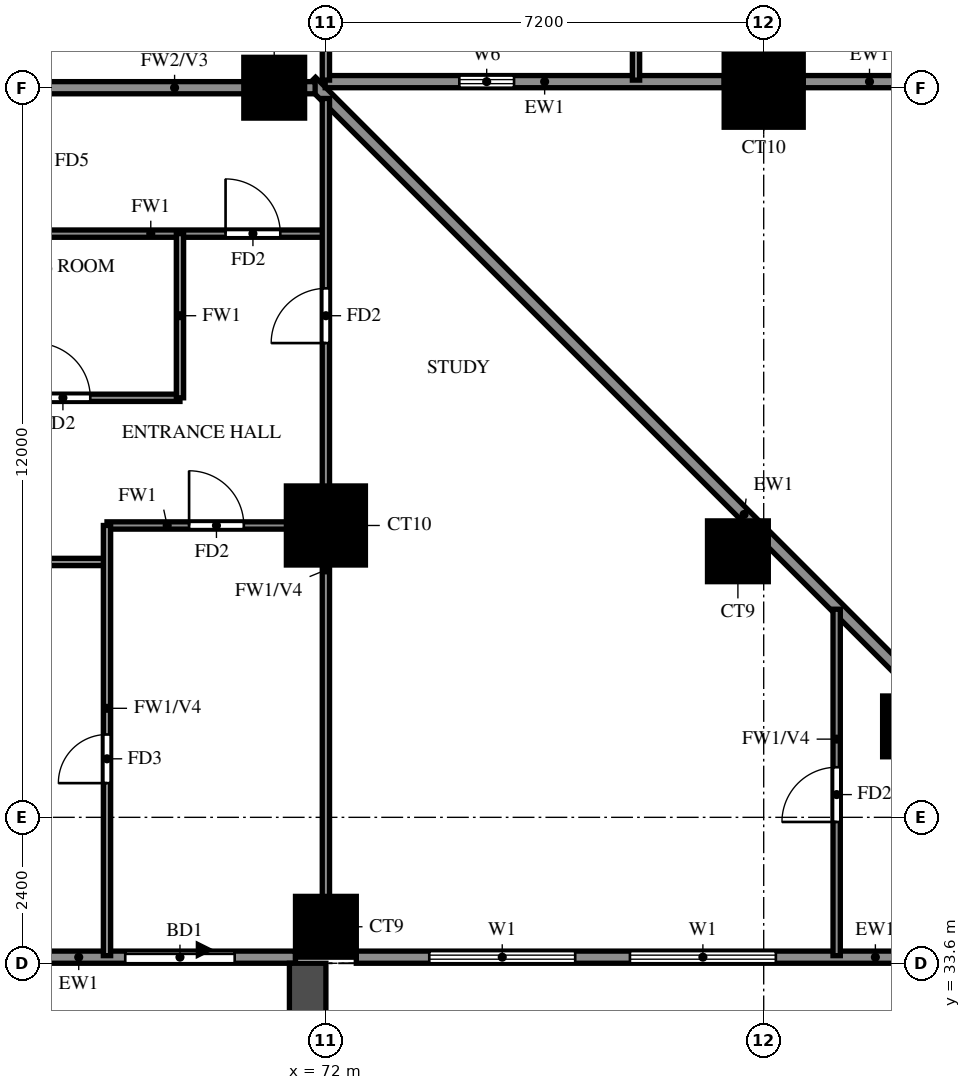
"""IFC4 building model, lengths in metres.
Left out: names, types, materials, properties, quantities, classifications, styles, units other than length and angle.
Written with IfcOpenShell. Run it as: python <this file> out.ifc"""

import sys

from ifc_helpers import new_model, si_unit, direction, frame, frame_2d, origin, origin_2d, place, context, subcontext, project, spatial, rectangle, extrude, source, transform, mapped, element, fill, save


model = new_model("IFC4")
c1 = context("Model", 3, precision=1e-05, world=origin(), true_north=direction((0.0, 1.0)))
c2 = subcontext(c1, "Body", "Model", "MODEL_VIEW")
j1 = project(units=[si_unit("LENGTHUNIT", "METRE"), si_unit("PLANEANGLEUNIT", "RADIAN")], contexts=[c1])
p1 = place(None, origin())
s1 = spatial("IfcSite", under=j1, at=p1, CompositionType="ELEMENT")
p2 = place(p1, origin())
s2 = spatial("IfcBuilding", under=s1, at=p2, CompositionType="ELEMENT")
p3 = place(p2, frame((0.0, 0.0, 72.5)))
s3 = spatial("IfcBuildingStorey", under=s2, at=p3, CompositionType="ELEMENT", Elevation=72.5)
m1 = source(origin(), c2, "Body", "SweptSolid", [
    extrude(rectangle(XDim=1.0, YDim=1.0, at=origin_2d()), origin(), (0.0, 0.0, 1.0), 3.18),
])
for number, where, z_axis, x_axis in (
    (1, (72.0, 34.2, 0.0), (0.0, 0.0, 1.0), (1.0, 0.0, 0.0)),
    (2, (81.656, 37.496, 0.0), (0.0, 0.0, 1.0), (1.0, 0.0, 0.0)),
    (3, (78.776, 40.376, 0.0), (0.0, 0.0, 1.0), (1.0, 0.0, 0.0)),
):
    element("IfcColumn", number, at=place(p3, frame(where, z_axis=z_axis, x_axis=x_axis)), inside=s3, PredefinedType="COLUMN", context=c2, shape_type="MappedRepresentation", body=[
        mapped(m1, transform((0.0, 0.0, 0.0))),
    ])
m2 = source(origin(), c2, "Body", "SweptSolid", [
    extrude(rectangle(XDim=1.3, YDim=1.3, at=origin_2d()), origin(), (0.0, 0.0, 1.0), 3.18),
])
p4 = place(p3, frame((72.0, 40.8, 0.0), z_axis=(0.0, 0.0, 1.0), x_axis=(1.0, 0.0, 0.0)))
e4 = element("IfcColumn", 4, at=p4, inside=s3, PredefinedType="COLUMN", context=c2, shape_type="MappedRepresentation", body=[
    mapped(m2, transform((0.0, 0.0, 0.0))),
])
p5 = place(p3, frame((71.15, 48.0, 0.0), z_axis=(0.0, 0.0, 1.0), x_axis=(1.0, 0.0, 0.0)))
e5 = element("IfcColumn", 5, at=p5, inside=s3, PredefinedType="COLUMN", context=c2, shape_type="MappedRepresentation", body=[
    mapped(m1, transform((0.0, 0.0, 0.0))),
])
p6 = place(p3, frame((79.2, 48.0, 0.0), z_axis=(0.0, 0.0, 1.0), x_axis=(1.0, 0.0, 0.0)))
e6 = element("IfcColumn", 6, at=p6, inside=s3, PredefinedType="COLUMN", context=c2, shape_type="MappedRepresentation", body=[
    mapped(m2, transform((0.0, 0.0, 0.0))),
])
p7 = place(p3, frame((85.996, 33.863, 0.0), z_axis=(0.0, 0.0, 1.0), x_axis=(-0.707100718496, 0.707112843825, 0.0)))
e7 = element("IfcWall", 7, at=p7, inside=s3, PredefinedType="SOLIDWALL", context=c2, shape_type="SweptSolid", body=[
    extrude(rectangle(XDim=20.135, YDim=0.2, at=frame_2d((10.067, 0.0))), origin(), (0.0, 0.0, 1.0), 3.18),
])
p8 = place(p3, frame((71.989, 48.1, 0.0), z_axis=(0.0, 0.0, 1.0), x_axis=(1.0, 0.0, 0.0)))
e8 = element("IfcWall", 8, at=p8, inside=s3, PredefinedType="SOLIDWALL", context=c2, shape_type="SweptSolid", body=[
    extrude(rectangle(XDim=6.562, YDim=0.2, at=frame_2d((3.281, 0.0))), origin(), (0.0, 0.0, 1.0), 3.18),
])
p9 = place(p8, frame((2.206, 0.0, 1.5)))
e9 = element("IfcOpeningElement", 9, at=p9, cuts=e8, PredefinedType="OPENING", context=c2, shape_type="SweptSolid", body=[
    extrude(rectangle(XDim=0.9, YDim=0.9, at=frame_2d((0.45, 0.45))), frame((0.0, 0.11, 0.0), z_axis=(0.0, -1.0, 0.0), x_axis=(1.0, 0.0, 0.0)), (0.0, 0.0, 1.0), 0.22),
])
p10 = place(p3, frame((79.85, 48.1, 0.0), z_axis=(0.0, 0.0, 1.0), x_axis=(1.0, 0.0, 0.0)))
e10 = element("IfcWall", 10, at=p10, inside=s3, PredefinedType="SOLIDWALL", context=c2, shape_type="SweptSolid", body=[
    extrude(rectangle(XDim=5.45, YDim=0.2, at=frame_2d((2.725, 0.0))), origin(), (0.0, 0.0, 1.0), 3.18),
])
p11 = place(p10, frame((1.525, 0.0, 0.6)))
e11 = element("IfcOpeningElement", 11, at=p11, cuts=e10, PredefinedType="OPENING", context=c2, shape_type="SweptSolid", body=[
    extrude(rectangle(XDim=2.4, YDim=2.4, at=frame_2d((1.2, 1.2))), frame((0.0, 0.11, 0.0), z_axis=(0.0, -1.0, 0.0), x_axis=(1.0, 0.0, 0.0)), (0.0, 0.0, 1.0), 0.22),
])
p12 = place(p3, frame((65.3, 33.7, 0.0), z_axis=(0.0, 0.0, 1.0), x_axis=(1.0, 0.0, 0.0)))
e12 = element("IfcWall", 12, at=p12, inside=s3, PredefinedType="SOLIDWALL", context=c2, shape_type="SweptSolid", body=[
    extrude(rectangle(XDim=6.2, YDim=0.2, at=frame_2d((3.1, 0.0))), origin(), (0.0, 0.0, 1.0), 3.18),
])
p13 = place(p12, frame((3.4, 0.0, 0.0)))
e13 = element("IfcOpeningElement", 13, at=p13, cuts=e12, PredefinedType="OPENING", context=c2, shape_type="SweptSolid", body=[
    extrude(rectangle(XDim=1.8, YDim=2.4, at=frame_2d((0.9, 1.2))), frame((0.0, 0.11, 0.0), z_axis=(0.0, -1.0, 0.0), x_axis=(1.0, 0.0, 0.0)), (0.0, 0.0, 1.0), 0.22),
])
p14 = place(p12, frame((1.2, 0.0, 1.5)))
e14 = element("IfcOpeningElement", 14, at=p14, cuts=e12, PredefinedType="OPENING", context=c2, shape_type="SweptSolid", body=[
    extrude(rectangle(XDim=0.9, YDim=0.9, at=frame_2d((0.45, 0.45))), frame((0.0, 0.11, 0.0), z_axis=(0.0, -1.0, 0.0), x_axis=(1.0, 0.0, 0.0)), (0.0, 0.0, 1.0), 0.22),
])
p15 = place(p3, frame((72.5, 33.7, 0.0), z_axis=(0.0, 0.0, 1.0), x_axis=(1.0, 0.0, 0.0)))
e15 = element("IfcWall", 15, at=p15, inside=s3, PredefinedType="SOLIDWALL", context=c2, shape_type="SweptSolid", body=[
    extrude(rectangle(XDim=13.659, YDim=0.2, at=frame_2d((6.829, 0.0))), origin(), (0.0, 0.0, 1.0), 3.18),
])
p16 = place(p15, frame((1.2, 0.0, 0.6)))
e16 = element("IfcOpeningElement", 16, at=p16, cuts=e15, PredefinedType="OPENING", context=c2, shape_type="SweptSolid", body=[
    extrude(rectangle(XDim=2.4, YDim=2.4, at=frame_2d((1.2, 1.2))), frame((0.0, 0.11, 0.0), z_axis=(0.0, -1.0, 0.0), x_axis=(1.0, 0.0, 0.0)), (0.0, 0.0, 1.0), 0.22),
])
p17 = place(p15, frame((4.5, 0.0, 0.6)))
e17 = element("IfcOpeningElement", 17, at=p17, cuts=e15, PredefinedType="OPENING", context=c2, shape_type="SweptSolid", body=[
    extrude(rectangle(XDim=2.4, YDim=2.4, at=frame_2d((1.2, 1.2))), frame((0.0, 0.11, 0.0), z_axis=(0.0, -1.0, 0.0), x_axis=(1.0, 0.0, 0.0)), (0.0, 0.0, 1.0), 0.22),
])
p18 = place(p15, frame((9.479, 0.0, 0.6)))
e18 = element("IfcOpeningElement", 18, at=p18, cuts=e15, PredefinedType="OPENING", context=c2, shape_type="SweptSolid", body=[
    extrude(rectangle(XDim=2.4, YDim=2.4, at=frame_2d((1.2, 1.2))), frame((0.0, 0.11, 0.0), z_axis=(0.0, -1.0, 0.0), x_axis=(1.0, 0.0, 0.0)), (0.0, 0.0, 1.0), 0.22),
])
p19 = place(p3, frame((71.7, 33.6, 0.0), z_axis=(0.0, 0.0, 1.0), x_axis=(0.0, -1.0, 0.0)))
e19 = element("IfcWall", 19, at=p19, inside=s3, PredefinedType="SOLIDWALL", context=c2, shape_type="SweptSolid", body=[
    extrude(rectangle(XDim=2.7, YDim=0.6, at=frame_2d((1.35, 0.0))), origin(), (0.0, 0.0, 1.0), 2.85),
])
p20 = place(p3, frame((67.2, 48.0, 0.0), z_axis=(0.0, 0.0, 1.0), x_axis=(1.0, 0.0, 0.0)))
e20 = element("IfcWall", 20, at=p20, inside=s3, PredefinedType="SOLIDWALL", context=c2, shape_type="SweptSolid", body=[
    extrude(rectangle(XDim=4.623, YDim=0.2, at=frame_2d((2.312, 0.0))), origin(), (0.0, 0.0, 1.0), 3.18),
])
p21 = place(p3, frame((64.8, 40.2, 0.0), z_axis=(0.0, 0.0, 1.0), x_axis=(1.0, 0.0, 0.0)))
e21 = element("IfcWall", 21, at=p21, inside=s3, PredefinedType="PARTITIONING", context=c2, shape_type="SweptSolid", body=[
    extrude(rectangle(XDim=3.6, YDim=0.12, at=frame_2d((1.8, 0.0))), origin(), (0.0, 0.0, 1.0), 3.18),
])
p22 = place(p3, frame((68.4, 40.8, 0.0), z_axis=(0.0, 0.0, 1.0), x_axis=(1.0, 0.0, 0.0)))
e22 = element("IfcWall", 22, at=p22, inside=s3, PredefinedType="PARTITIONING", context=c2, shape_type="SweptSolid", body=[
    extrude(rectangle(XDim=3.6, YDim=0.12, at=frame_2d((1.8, 0.0))), origin(), (0.0, 0.0, 1.0), 3.18),
])
p23 = place(p22, frame((1.35, 0.0, 0.0)))
e23 = element("IfcOpeningElement", 23, at=p23, cuts=e22, PredefinedType="OPENING", context=c2, shape_type="SweptSolid", body=[
    extrude(rectangle(XDim=0.9, YDim=2.1, at=frame_2d((0.45, 1.05))), frame((0.0, 0.07, 0.0), z_axis=(0.0, -1.0, 0.0), x_axis=(1.0, 0.0, 0.0)), (0.0, 0.0, 1.0), 0.14),
])
p24 = place(p3, frame((60.0, 42.9, 0.0), z_axis=(0.0, 0.0, 1.0), x_axis=(1.0, 0.0, 0.0)))
e24 = element("IfcWall", 24, at=p24, inside=s3, PredefinedType="PARTITIONING", context=c2, shape_type="SweptSolid", body=[
    extrude(rectangle(XDim=9.6, YDim=0.12, at=frame_2d((4.8, 0.0))), origin(), (0.0, 0.0, 1.0), 3.18),
])
p25 = place(p24, frame((7.225, 0.0, 0.0)))
e25 = element("IfcOpeningElement", 25, at=p25, cuts=e24, PredefinedType="OPENING", context=c2, shape_type="SweptSolid", body=[
    extrude(rectangle(XDim=0.9, YDim=2.1, at=frame_2d((0.45, 1.05))), frame((0.0, 0.07, 0.0), z_axis=(0.0, -1.0, 0.0), x_axis=(1.0, 0.0, 0.0)), (0.0, 0.0, 1.0), 0.14),
])
p26 = place(p24, frame((2.425, 0.0, 0.0)))
e26 = element("IfcOpeningElement", 26, at=p26, cuts=e24, PredefinedType="OPENING", context=c2, shape_type="SweptSolid", body=[
    extrude(rectangle(XDim=0.9, YDim=2.1, at=frame_2d((0.45, 1.05))), frame((0.0, 0.07, 0.0), z_axis=(0.0, -1.0, 0.0), x_axis=(1.0, 0.0, 0.0)), (0.0, 0.0, 1.0), 0.14),
])
p27 = place(p3, frame((67.2, 45.6, 0.0), z_axis=(0.0, 0.0, 1.0), x_axis=(1.0, 0.0, 0.0)))
e27 = element("IfcWall", 27, at=p27, inside=s3, PredefinedType="PARTITIONING", context=c2, shape_type="SweptSolid", body=[
    extrude(rectangle(XDim=4.8, YDim=0.12, at=frame_2d((2.4, 0.0))), origin(), (0.0, 0.0, 1.0), 3.18),
])
p28 = place(p27, frame((3.15, 0.0, 0.0)))
e28 = element("IfcOpeningElement", 28, at=p28, cuts=e27, PredefinedType="OPENING", context=c2, shape_type="SweptSolid", body=[
    extrude(rectangle(XDim=0.9, YDim=2.1, at=frame_2d((0.45, 1.05))), frame((0.0, 0.07, 0.0), z_axis=(0.0, -1.0, 0.0), x_axis=(1.0, 0.0, 0.0)), (0.0, 0.0, 1.0), 0.14),
])
p29 = place(p3, frame((68.4, 33.725, 0.0), z_axis=(0.0, 0.0, 1.0), x_axis=(0.0, 1.0, 0.0)))
e29 = element("IfcWall", 29, at=p29, inside=s3, PredefinedType="PARTITIONING", context=c2, shape_type="SweptSolid", body=[
    extrude(rectangle(XDim=7.075, YDim=0.12, at=frame_2d((3.538, 0.0))), origin(), (0.0, 0.0, 1.0), 2.28),
])
p30 = place(p29, frame((2.837, 0.0, 0.0)))
e30 = element("IfcOpeningElement", 30, at=p30, cuts=e29, PredefinedType="OPENING", context=c2, shape_type="SweptSolid", body=[
    extrude(rectangle(XDim=0.8, YDim=2.1, at=frame_2d((0.4, 1.05))), frame((0.0, 0.07, 0.0), z_axis=(0.0, -1.0, 0.0), x_axis=(1.0, 0.0, 0.0)), (0.0, 0.0, 1.0), 0.14),
])
p31 = place(p3, frame((69.6, 42.9, 0.0), z_axis=(0.0, 0.0, 1.0), x_axis=(0.0, 1.0, 0.0)))
e31 = element("IfcWall", 31, at=p31, inside=s3, PredefinedType="PARTITIONING", context=c2, shape_type="SweptSolid", body=[
    extrude(rectangle(XDim=2.7, YDim=0.12, at=frame_2d((1.35, 0.0))), origin(), (0.0, 0.0, 1.0), 3.18),
])
p32 = place(p3, frame((72.0, 33.725, 0.0), z_axis=(0.0, 0.0, 1.0), x_axis=(0.0, 1.0, 0.0)))
e32 = element("IfcWall", 32, at=p32, inside=s3, PredefinedType="PARTITIONING", context=c2, shape_type="SweptSolid", body=[
    extrude(rectangle(XDim=14.098, YDim=0.12, at=frame_2d((7.049, 0.0))), origin(), (0.0, 0.0, 1.0), 2.28),
])
p33 = place(p32, frame((10.075, 0.0, 0.0)))
e33 = element("IfcOpeningElement", 33, at=p33, cuts=e32, PredefinedType="OPENING", context=c2, shape_type="SweptSolid", body=[
    extrude(rectangle(XDim=0.9, YDim=2.1, at=frame_2d((0.45, 1.05))), frame((0.0, 0.07, 0.0), z_axis=(0.0, -1.0, 0.0), x_axis=(1.0, 0.0, 0.0)), (0.0, 0.0, 1.0), 0.14),
])
for number, where, z_axis, x_axis in (
    (34, (72.0, 48.125, 0.0), (0.0, 0.0, 1.0), (0.0, 1.0, 0.0)),
    (35, (77.1, 48.125, 0.0), (0.0, 0.0, 1.0), (0.0, 1.0, 0.0)),
):
    element("IfcWall", number, at=place(p3, frame(where, z_axis=z_axis, x_axis=x_axis)), inside=s3, PredefinedType="PARTITIONING", context=c2, shape_type="SweptSolid", body=[
        extrude(rectangle(XDim=3.475, YDim=0.12, at=frame_2d((1.738, 0.0))), origin(), (0.0, 0.0, 1.0), 3.18),
    ])
p34 = place(p3, frame((79.2, 48.125, 0.0), z_axis=(0.0, 0.0, 1.0), x_axis=(0.0, 1.0, 0.0)))
e36 = element("IfcWall", 36, at=p34, inside=s3, PredefinedType="PARTITIONING", context=c2, shape_type="SweptSolid", body=[
    extrude(rectangle(XDim=25.075, YDim=0.12, at=frame_2d((12.538, 0.0))), origin(), (0.0, 0.0, 1.0), 3.18),
])
p35 = place(p34, frame((2.788, 0.0, 0.0)))
e37 = element("IfcOpeningElement", 37, at=p35, cuts=e36, PredefinedType="OPENING", context=c2, shape_type="SweptSolid", body=[
    extrude(rectangle(XDim=1.5, YDim=2.1, at=frame_2d((0.75, 1.05))), frame((0.0, 0.07, 0.0), z_axis=(0.0, -1.0, 0.0), x_axis=(1.0, 0.0, 0.0)), (0.0, 0.0, 1.0), 0.14),
])
p36 = place(p34, frame((8.425, 0.0, 0.0)))
e38 = element("IfcOpeningElement", 38, at=p36, cuts=e36, PredefinedType="OPENING", context=c2, shape_type="SweptSolid", body=[
    extrude(rectangle(XDim=0.9, YDim=2.1, at=frame_2d((0.45, 1.05))), frame((0.0, 0.07, 0.0), z_axis=(0.0, -1.0, 0.0), x_axis=(1.0, 0.0, 0.0)), (0.0, 0.0, 1.0), 0.14),
])
p37 = place(p34, frame((12.025, 0.0, 0.0)))
e39 = element("IfcOpeningElement", 39, at=p37, cuts=e36, PredefinedType="OPENING", context=c2, shape_type="SweptSolid", body=[
    extrude(rectangle(XDim=0.9, YDim=2.1, at=frame_2d((0.45, 1.05))), frame((0.0, 0.07, 0.0), z_axis=(0.0, -1.0, 0.0), x_axis=(1.0, 0.0, 0.0)), (0.0, 0.0, 1.0), 0.14),
])
p38 = place(p34, frame((15.625, 0.0, 0.0)))
e40 = element("IfcOpeningElement", 40, at=p38, cuts=e36, PredefinedType="OPENING", context=c2, shape_type="SweptSolid", body=[
    extrude(rectangle(XDim=0.9, YDim=2.1, at=frame_2d((0.45, 1.05))), frame((0.0, 0.07, 0.0), z_axis=(0.0, -1.0, 0.0), x_axis=(1.0, 0.0, 0.0)), (0.0, 0.0, 1.0), 0.14),
])
p39 = place(p34, frame((19.225, 0.0, 0.0)))
e41 = element("IfcOpeningElement", 41, at=p39, cuts=e36, PredefinedType="OPENING", context=c2, shape_type="SweptSolid", body=[
    extrude(rectangle(XDim=0.9, YDim=2.1, at=frame_2d((0.45, 1.05))), frame((0.0, 0.07, 0.0), z_axis=(0.0, -1.0, 0.0), x_axis=(1.0, 0.0, 0.0)), (0.0, 0.0, 1.0), 0.14),
])
p40 = place(p34, frame((22.825, 0.0, 0.0)))
e42 = element("IfcOpeningElement", 42, at=p40, cuts=e36, PredefinedType="OPENING", context=c2, shape_type="SweptSolid", body=[
    extrude(rectangle(XDim=0.9, YDim=2.1, at=frame_2d((0.45, 1.05))), frame((0.0, 0.07, 0.0), z_axis=(0.0, -1.0, 0.0), x_axis=(1.0, 0.0, 0.0)), (0.0, 0.0, 1.0), 0.14),
])
p41 = place(p3, frame((80.4, 33.725, 0.0), z_axis=(0.0, 0.0, 1.0), x_axis=(0.0, 1.0, 0.0)))
e43 = element("IfcWall", 43, at=p41, inside=s3, PredefinedType="PARTITIONING", context=c2, shape_type="SweptSolid", body=[
    extrude(rectangle(XDim=5.698, YDim=0.12, at=frame_2d((2.849, 0.0))), origin(), (0.0, 0.0, 1.0), 2.28),
])
p42 = place(p41, frame((2.199, 0.0, 0.0)))
e44 = element("IfcOpeningElement", 44, at=p42, cuts=e43, PredefinedType="OPENING", context=c2, shape_type="SweptSolid", body=[
    extrude(rectangle(XDim=0.9, YDim=2.1, at=frame_2d((0.45, 1.05))), frame((0.0, 0.07, 0.0), z_axis=(0.0, -1.0, 0.0), x_axis=(1.0, 0.0, 0.0)), (0.0, 0.0, 1.0), 0.14),
])
p43 = place(p9, origin())
e45 = element("IfcWindow", 45, at=p43, inside=s3, PartitioningType="SINGLE_PANEL", PredefinedType="WINDOW", context=c2, shape_type="SweptSolid", body=[
    extrude(rectangle(XDim=0.9, YDim=0.9, at=frame_2d((0.45, 0.45))), frame((0.0, 0.03, 0.0), z_axis=(0.0, -1.0, 0.0), x_axis=(1.0, 0.0, 0.0)), (0.0, 0.0, 1.0), 0.06),
])
fill(e9, e45)
p44 = place(p13, origin())
e46 = element("IfcDoor", 46, at=p44, inside=s3, OperationType="DOUBLE_DOOR_SLIDING", PredefinedType="DOOR", context=c2, shape_type="SweptSolid", body=[
    extrude(rectangle(XDim=1.8, YDim=2.4, at=frame_2d((0.9, 1.2))), frame((0.0, 0.025, 0.0), z_axis=(0.0, -1.0, 0.0), x_axis=(1.0, 0.0, 0.0)), (0.0, 0.0, 1.0), 0.05),
])
fill(e13, e46)
p45 = place(p16, origin())
e47 = element("IfcWindow", 47, at=p45, inside=s3, PartitioningType="DOUBLE_PANEL_VERTICAL", PredefinedType="WINDOW", context=c2, shape_type="SweptSolid", body=[
    extrude(rectangle(XDim=2.4, YDim=2.4, at=frame_2d((1.2, 1.2))), frame((0.0, 0.03, 0.0), z_axis=(0.0, -1.0, 0.0), x_axis=(1.0, 0.0, 0.0)), (0.0, 0.0, 1.0), 0.06),
])
fill(e16, e47)
p46 = place(p17, origin())
e48 = element("IfcWindow", 48, at=p46, inside=s3, PartitioningType="DOUBLE_PANEL_VERTICAL", PredefinedType="WINDOW", context=c2, shape_type="SweptSolid", body=[
    extrude(rectangle(XDim=2.4, YDim=2.4, at=frame_2d((1.2, 1.2))), frame((0.0, 0.03, 0.0), z_axis=(0.0, -1.0, 0.0), x_axis=(1.0, 0.0, 0.0)), (0.0, 0.0, 1.0), 0.06),
])
fill(e17, e48)
p47 = place(p28, origin())
e49 = element("IfcDoor", 49, at=p47, inside=s3, OperationType="SINGLE_SWING_RIGHT", PredefinedType="DOOR", context=c2, shape_type="SweptSolid", body=[
    extrude(rectangle(XDim=0.9, YDim=2.1, at=frame_2d((0.45, 1.05))), frame((0.0, 0.025, 0.0), z_axis=(0.0, -1.0, 0.0), x_axis=(1.0, 0.0, 0.0)), (0.0, 0.0, 1.0), 0.05),
])
fill(e28, e49)
p48 = place(p23, origin())
e50 = element("IfcDoor", 50, at=p48, inside=s3, OperationType="SINGLE_SWING_LEFT", PredefinedType="DOOR", context=c2, shape_type="SweptSolid", body=[
    extrude(rectangle(XDim=0.9, YDim=2.1, at=frame_2d((0.45, 1.05))), frame((0.0, 0.025, 0.0), z_axis=(0.0, -1.0, 0.0), x_axis=(1.0, 0.0, 0.0)), (0.0, 0.0, 1.0), 0.05),
])
fill(e23, e50)
p49 = place(p30, origin())
e51 = element("IfcDoor", 51, at=p49, inside=s3, OperationType="SINGLE_SWING_RIGHT", PredefinedType="DOOR", context=c2, shape_type="SweptSolid", body=[
    extrude(rectangle(XDim=0.8, YDim=2.1, at=frame_2d((0.4, 1.05))), frame((0.0, 0.025, 0.0), z_axis=(0.0, -1.0, 0.0), x_axis=(1.0, 0.0, 0.0)), (0.0, 0.0, 1.0), 0.05),
])
fill(e30, e51)
p50 = place(p25, origin())
e52 = element("IfcDoor", 52, at=p50, inside=s3, OperationType="SINGLE_SWING_LEFT", PredefinedType="DOOR", context=c2, shape_type="SweptSolid", body=[
    extrude(rectangle(XDim=0.9, YDim=2.1, at=frame_2d((0.45, 1.05))), frame((0.0, 0.025, 0.0), z_axis=(0.0, -1.0, 0.0), x_axis=(1.0, 0.0, 0.0)), (0.0, 0.0, 1.0), 0.05),
])
fill(e25, e52)
p51 = place(p33, origin())
e53 = element("IfcDoor", 53, at=p51, inside=s3, OperationType="SINGLE_SWING_LEFT", PredefinedType="DOOR", context=c2, shape_type="SweptSolid", body=[
    extrude(rectangle(XDim=0.9, YDim=2.1, at=frame_2d((0.45, 1.05))), frame((0.0, 0.025, 0.0), z_axis=(0.0, -1.0, 0.0), x_axis=(1.0, 0.0, 0.0)), (0.0, 0.0, 1.0), 0.05),
])
fill(e33, e53)
p52 = place(p42, origin())
e54 = element("IfcDoor", 54, at=p52, inside=s3, OperationType="SINGLE_SWING_RIGHT", PredefinedType="DOOR", context=c2, shape_type="SweptSolid", body=[
    extrude(rectangle(XDim=0.9, YDim=2.1, at=frame_2d((0.45, 1.05))), frame((0.0, 0.025, 0.0), z_axis=(0.0, -1.0, 0.0), x_axis=(1.0, 0.0, 0.0)), (0.0, 0.0, 1.0), 0.05),
])
fill(e44, e54)
save(model, sys.argv[1])
